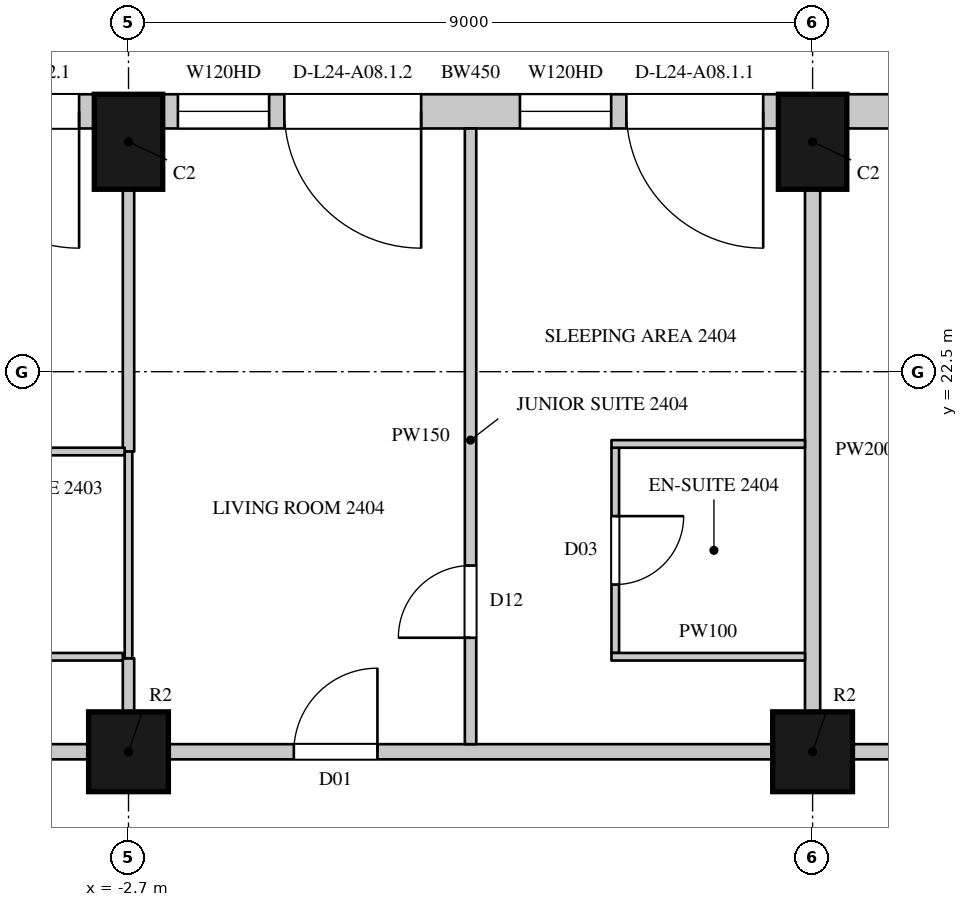
"""IFC4 building model, lengths in metres.
Left out: names, types, materials, properties, quantities, classifications, styles, units other than length and angle.
Written with IfcOpenShell. Run it as: python <this file> out.ifc"""

import sys

from ifc_helpers import new_model, si_unit, direction, frame, frame_2d, origin, origin_2d, place, context, subcontext, project, spatial, rectangle, circle, extrude, element, fill, save


model = new_model("IFC4")
c1 = context("Model", 3, precision=1e-05, world=origin(), true_north=direction((0.0, 1.0)))
c2 = subcontext(c1, "Body", "Model", "MODEL_VIEW")
j1 = project(units=[si_unit("LENGTHUNIT", "METRE"), si_unit("PLANEANGLEUNIT", "RADIAN")], contexts=[c1])
p1 = place(None, origin())
s1 = spatial("IfcSite", under=j1, at=p1, CompositionType="ELEMENT")
p2 = place(p1, origin())
s2 = spatial("IfcBuilding", under=s1, at=p2, CompositionType="ELEMENT")
p3 = place(p2, frame((0.0, 0.0, 116.7)))
s3 = spatial("IfcBuildingStorey", under=s2, at=p3, CompositionType="ELEMENT", Elevation=116.7)
for number, where, z_axis, x_axis in (
    (1, (6.3, 25.525, 0.0), (0.0, 0.0, 1.0), (-1.0, 0.0, 0.0)),
    (2, (-2.7, 25.525, 0.0), (0.0, 0.0, 1.0), (-1.0, 0.0, 0.0)),
):
    element("IfcColumn", number, at=place(p3, frame(where, z_axis=z_axis, x_axis=x_axis)), inside=s3, PredefinedType="COLUMN", context=c2, shape_type="SweptSolid", body=[
        extrude(rectangle(XDim=0.9, YDim=1.25, at=origin_2d()), origin(), (0.0, 0.0, 1.0), 3.6),
    ])
for number, where, z_axis, x_axis in (
    (3, (-2.7, 17.5, 0.0), (0.0, 0.0, 1.0), (1.0, 0.0, 0.0)),
    (4, (6.3, 17.5, 0.0), (0.0, 0.0, 1.0), (1.0, 0.0, 0.0)),
):
    element("IfcColumn", number, at=place(p3, frame(where, z_axis=z_axis, x_axis=x_axis)), inside=s3, PredefinedType="COLUMN", context=c2, shape_type="SweptSolid", body=[
        extrude(circle(Radius=0.525, at=origin_2d()), origin(), (0.0, 0.0, 1.0), 3.6),
    ])
p4 = place(p3, frame((11.989, 25.925, 0.0), z_axis=(0.0, 0.0, 1.0), x_axis=(-1.0, 0.0, 0.0)))
e5 = element("IfcWall", 5, at=p4, inside=s3, PredefinedType="SOLIDWALL", context=c2, shape_type="SweptSolid", body=[
    extrude(rectangle(XDim=5.239, YDim=0.45, at=frame_2d((2.619, 0.0))), origin(), (0.0, 0.0, 1.0), 3.3),
])
p5 = place(p4, frame((1.77, 0.0, 1.05)))
e6 = element("IfcOpeningElement", 6, at=p5, cuts=e5, PredefinedType="OPENING", context=c2, shape_type="SweptSolid", body=[
    extrude(rectangle(XDim=2.1, YDim=2.0, at=frame_2d((1.05, 1.0))), frame((0.0, 0.235, 0.0), z_axis=(0.0, -1.0, 0.0), x_axis=(1.0, 0.0, 0.0)), (0.0, 0.0, 1.0), 0.47),
])
p6 = place(p3, frame((5.85, 25.925, 0.0), z_axis=(0.0, 0.0, 1.0), x_axis=(-1.0, 0.0, 0.0)))
e7 = element("IfcWall", 7, at=p6, inside=s3, PredefinedType="SOLIDWALL", context=c2, shape_type="SweptSolid", body=[
    extrude(rectangle(XDim=8.1, YDim=0.45, at=frame_2d((4.05, 0.0))), origin(), (0.0, 0.0, 1.0), 3.3),
])
p7 = place(p6, frame((0.2, 0.0, 0.0)))
e8 = element("IfcOpeningElement", 8, at=p7, cuts=e7, PredefinedType="OPENING", context=c2, shape_type="SweptSolid", body=[
    extrude(rectangle(XDim=1.8, YDim=2.4, at=frame_2d((0.9, 1.2))), frame((0.0, 0.235, 0.0), z_axis=(0.0, -1.0, 0.0), x_axis=(1.0, 0.0, 0.0)), (0.0, 0.0, 1.0), 0.47),
])
p8 = place(p6, frame((2.2, 0.0, 1.05)))
e9 = element("IfcOpeningElement", 9, at=p8, cuts=e7, PredefinedType="OPENING", context=c2, shape_type="SweptSolid", body=[
    extrude(rectangle(XDim=1.2, YDim=2.0, at=frame_2d((0.6, 1.0))), frame((0.0, 0.235, 0.0), z_axis=(0.0, -1.0, 0.0), x_axis=(1.0, 0.0, 0.0)), (0.0, 0.0, 1.0), 0.47),
])
p9 = place(p6, frame((4.7, 0.0, 0.0)))
e10 = element("IfcOpeningElement", 10, at=p9, cuts=e7, PredefinedType="OPENING", context=c2, shape_type="SweptSolid", body=[
    extrude(rectangle(XDim=1.8, YDim=2.4, at=frame_2d((0.9, 1.2))), frame((0.0, 0.235, 0.0), z_axis=(0.0, -1.0, 0.0), x_axis=(1.0, 0.0, 0.0)), (0.0, 0.0, 1.0), 0.47),
])
p10 = place(p6, frame((6.7, 0.0, 1.05)))
e11 = element("IfcOpeningElement", 11, at=p10, cuts=e7, PredefinedType="OPENING", context=c2, shape_type="SweptSolid", body=[
    extrude(rectangle(XDim=1.2, YDim=2.0, at=frame_2d((0.6, 1.0))), frame((0.0, 0.235, 0.0), z_axis=(0.0, -1.0, 0.0), x_axis=(1.0, 0.0, 0.0)), (0.0, 0.0, 1.0), 0.47),
])
p11 = place(p3, frame((-3.15, 25.925, 0.0), z_axis=(0.0, 0.0, 1.0), x_axis=(-1.0, 0.0, 0.0)))
e12 = element("IfcWall", 12, at=p11, inside=s3, PredefinedType="SOLIDWALL", context=c2, shape_type="SweptSolid", body=[
    extrude(rectangle(XDim=8.1, YDim=0.45, at=frame_2d((4.05, 0.0))), origin(), (0.0, 0.0, 1.0), 3.3),
])
p12 = place(p11, frame((0.2, 0.0, 0.0)))
e13 = element("IfcOpeningElement", 13, at=p12, cuts=e12, PredefinedType="OPENING", context=c2, shape_type="SweptSolid", body=[
    extrude(rectangle(XDim=1.8, YDim=2.4, at=frame_2d((0.9, 1.2))), frame((0.0, 0.235, 0.0), z_axis=(0.0, -1.0, 0.0), x_axis=(1.0, 0.0, 0.0)), (0.0, 0.0, 1.0), 0.47),
])
p13 = place(p11, frame((2.2, 0.0, 1.05)))
e14 = element("IfcOpeningElement", 14, at=p13, cuts=e12, PredefinedType="OPENING", context=c2, shape_type="SweptSolid", body=[
    extrude(rectangle(XDim=1.2, YDim=2.0, at=frame_2d((0.6, 1.0))), frame((0.0, 0.235, 0.0), z_axis=(0.0, -1.0, 0.0), x_axis=(1.0, 0.0, 0.0)), (0.0, 0.0, 1.0), 0.47),
])
p14 = place(p11, frame((4.7, 0.0, 0.0)))
e15 = element("IfcOpeningElement", 15, at=p14, cuts=e12, PredefinedType="OPENING", context=c2, shape_type="SweptSolid", body=[
    extrude(rectangle(XDim=1.8, YDim=2.4, at=frame_2d((0.9, 1.2))), frame((0.0, 0.235, 0.0), z_axis=(0.0, -1.0, 0.0), x_axis=(1.0, 0.0, 0.0)), (0.0, 0.0, 1.0), 0.47),
])
p15 = place(p11, frame((6.7, 0.0, 1.05)))
e16 = element("IfcOpeningElement", 16, at=p15, cuts=e12, PredefinedType="OPENING", context=c2, shape_type="SweptSolid", body=[
    extrude(rectangle(XDim=1.2, YDim=2.0, at=frame_2d((0.6, 1.0))), frame((0.0, 0.235, 0.0), z_axis=(0.0, -1.0, 0.0), x_axis=(1.0, 0.0, 0.0)), (0.0, 0.0, 1.0), 0.47),
])
p16 = place(p3, frame((-11.175, 17.5, 0.0), z_axis=(0.0, 0.0, 1.0), x_axis=(1.0, 0.0, 0.0)))
e17 = element("IfcWall", 17, at=p16, inside=s3, PredefinedType="PARTITIONING", context=c2, shape_type="SweptSolid", body=[
    extrude(rectangle(XDim=7.95, YDim=0.2, at=frame_2d((3.975, 0.0))), origin(), (0.0, 0.0, 1.0), 2.75),
])
p17 = place(p16, frame((4.55, 0.0, 0.0)))
e18 = element("IfcOpeningElement", 18, at=p17, cuts=e17, PredefinedType="OPENING", context=c2, shape_type="SweptSolid", body=[
    extrude(rectangle(XDim=0.95, YDim=2.2, at=frame_2d((0.475, 1.1))), frame((0.0, 0.11, 0.0), z_axis=(0.0, -1.0, 0.0), x_axis=(1.0, 0.0, 0.0)), (0.0, 0.0, 1.0), 0.22),
])
p18 = place(p3, frame((-2.175, 17.5, 0.0), z_axis=(0.0, 0.0, 1.0), x_axis=(1.0, 0.0, 0.0)))
e19 = element("IfcWall", 19, at=p18, inside=s3, PredefinedType="PARTITIONING", context=c2, shape_type="SweptSolid", body=[
    extrude(rectangle(XDim=7.95, YDim=0.2, at=frame_2d((3.975, 0.0))), origin(), (0.0, 0.0, 1.0), 2.75),
])
p19 = place(p18, frame((1.65, 0.0, 0.0)))
e20 = element("IfcOpeningElement", 20, at=p19, cuts=e19, PredefinedType="OPENING", context=c2, shape_type="SweptSolid", body=[
    extrude(rectangle(XDim=1.1, YDim=2.4, at=frame_2d((0.55, 1.2))), frame((0.0, 0.11, 0.0), z_axis=(0.0, -1.0, 0.0), x_axis=(1.0, 0.0, 0.0)), (0.0, 0.0, 1.0), 0.22),
])
p20 = place(p3, frame((6.825, 17.5, 0.0), z_axis=(0.0, 0.0, 1.0), x_axis=(1.0, 0.0, 0.0)))
e21 = element("IfcWall", 21, at=p20, inside=s3, PredefinedType="PARTITIONING", context=c2, shape_type="SweptSolid", body=[
    extrude(rectangle(XDim=7.95, YDim=0.2, at=frame_2d((3.975, 0.0))), origin(), (0.0, 0.0, 1.0), 2.75),
])
p21 = place(p20, frame((1.55, 0.0, 0.0)))
e22 = element("IfcOpeningElement", 22, at=p21, cuts=e21, PredefinedType="OPENING", context=c2, shape_type="SweptSolid", body=[
    extrude(rectangle(XDim=1.1, YDim=2.4, at=frame_2d((0.55, 1.2))), frame((0.0, 0.11, 0.0), z_axis=(0.0, -1.0, 0.0), x_axis=(1.0, 0.0, 0.0)), (0.0, 0.0, 1.0), 0.22),
])
p22 = place(p3, frame((-2.7, 18.025, 0.0), z_axis=(0.0, 0.0, 1.0), x_axis=(0.0, 1.0, 0.0)))
e23 = element("IfcWall", 23, at=p22, inside=s3, PredefinedType="PARTITIONING", context=c2, shape_type="SweptSolid", body=[
    extrude(rectangle(XDim=0.705, YDim=0.15, at=frame_2d((0.353, 0.0))), origin(), (0.0, 0.0, 1.0), 2.75),
])
p23 = place(p3, frame((-2.7, 21.45, 0.0), z_axis=(0.0, 0.0, 1.0), x_axis=(0.0, 1.0, 0.0)))
e24 = element("IfcWall", 24, at=p23, inside=s3, PredefinedType="PARTITIONING", context=c2, shape_type="SweptSolid", body=[
    extrude(rectangle(XDim=3.45, YDim=0.15, at=frame_2d((1.725, 0.0))), origin(), (0.0, 0.0, 1.0), 2.75),
])
p24 = place(p3, frame((1.8, 17.6, 0.0), z_axis=(0.0, 0.0, 1.0), x_axis=(0.0, 1.0, 0.0)))
e25 = element("IfcWall", 25, at=p24, inside=s3, PredefinedType="PARTITIONING", context=c2, shape_type="SweptSolid", body=[
    extrude(rectangle(XDim=8.1, YDim=0.15, at=frame_2d((4.05, 0.0))), origin(), (0.0, 0.0, 1.0), 2.65),
])
p25 = place(p24, frame((1.4, 0.0, 0.0)))
e26 = element("IfcOpeningElement", 26, at=p25, cuts=e25, PredefinedType="OPENING", context=c2, shape_type="SweptSolid", body=[
    extrude(rectangle(XDim=0.95, YDim=2.2, at=frame_2d((0.475, 1.1))), frame((0.0, 0.085, 0.0), z_axis=(0.0, -1.0, 0.0), x_axis=(1.0, 0.0, 0.0)), (0.0, 0.0, 1.0), 0.17),
])
p26 = place(p3, frame((6.3, 18.025, 0.0), z_axis=(0.0, 0.0, 1.0), x_axis=(0.0, 1.0, 0.0)))
e27 = element("IfcWall", 27, at=p26, inside=s3, PredefinedType="PARTITIONING", context=c2, shape_type="SweptSolid", body=[
    extrude(rectangle(XDim=6.875, YDim=0.2, at=frame_2d((3.438, 0.0))), origin(), (0.0, 0.0, 1.0), 2.75),
])
p27 = place(p3, frame((-5.146, 18.75, 0.0), z_axis=(0.0, 0.0, 1.0), x_axis=(1.0, 0.0, 0.0)))
e28 = element("IfcWall", 28, at=p27, inside=s3, PredefinedType="PARTITIONING", context=c2, shape_type="SweptSolid", body=[
    extrude(rectangle(XDim=2.371, YDim=0.1, at=frame_2d((1.186, 0.0))), origin(), (0.0, 0.0, 1.0), 3.3),
])
p28 = place(p3, frame((-5.146, 21.45, 0.0), z_axis=(0.0, 0.0, 1.0), x_axis=(1.0, 0.0, 0.0)))
e29 = element("IfcWall", 29, at=p28, inside=s3, PredefinedType="PARTITIONING", context=c2, shape_type="SweptSolid", body=[
    extrude(rectangle(XDim=2.396, YDim=0.1, at=frame_2d((1.198, 0.0))), origin(), (0.0, 0.0, 1.0), 3.3),
])
p29 = place(p3, frame((-2.7, 18.73, 0.0), z_axis=(0.0, 0.0, 1.0), x_axis=(0.0, 1.0, 0.0)))
e30 = element("IfcWall", 30, at=p29, inside=s3, PredefinedType="PARTITIONING", context=c2, shape_type="SweptSolid", body=[
    extrude(rectangle(XDim=2.72, YDim=0.1, at=frame_2d((1.36, 0.0))), origin(), (0.0, 0.0, 1.0), 2.75),
])
p30 = place(p3, frame((3.704, 18.8, 0.0), z_axis=(0.0, 0.0, 1.0), x_axis=(0.0, 1.0, 0.0)))
e31 = element("IfcWall", 31, at=p30, inside=s3, PredefinedType="PARTITIONING", context=c2, shape_type="SweptSolid", body=[
    extrude(rectangle(XDim=2.7, YDim=0.1, at=frame_2d((1.35, 0.0))), origin(), (0.0, 0.0, 1.0), 3.3),
])
p31 = place(p30, frame((0.9, 0.0, 0.0)))
e32 = element("IfcOpeningElement", 32, at=p31, cuts=e31, PredefinedType="OPENING", context=c2, shape_type="SweptSolid", body=[
    extrude(rectangle(XDim=0.9, YDim=2.2, at=frame_2d((0.45, 1.1))), frame((0.0, 0.06, 0.0), z_axis=(0.0, -1.0, 0.0), x_axis=(1.0, 0.0, 0.0)), (0.0, 0.0, 1.0), 0.12),
])
for number, where, z_axis, x_axis in (
    (33, (3.654, 18.75, 0.0), (0.0, 0.0, 1.0), (1.0, 0.0, 0.0)),
    (34, (3.654, 21.55, 0.0), (0.0, 0.0, 1.0), (1.0, 0.0, 0.0)),
):
    element("IfcWall", number, at=place(p3, frame(where, z_axis=z_axis, x_axis=x_axis)), inside=s3, PredefinedType="PARTITIONING", context=c2, shape_type="SweptSolid", body=[
        extrude(rectangle(XDim=2.546, YDim=0.1, at=frame_2d((1.273, 0.0))), origin(), (0.0, 0.0, 1.0), 3.3),
    ])
p32 = place(p7, origin())
e35 = element("IfcDoor", 35, at=p32, inside=s3, OperationType="SLIDING_TO_LEFT", PredefinedType="DOOR", context=c2, shape_type="SweptSolid", body=[
    extrude(rectangle(XDim=1.8, YDim=2.4, at=frame_2d((0.9, 1.2))), frame((0.0, 0.13, 0.0), z_axis=(0.0, -1.0, 0.0), x_axis=(1.0, 0.0, 0.0)), (0.0, 0.0, 1.0), 0.05),
])
fill(e8, e35)
p33 = place(p8, origin())
e36 = element("IfcWindow", 36, at=p33, inside=s3, PartitioningType="SINGLE_PANEL", PredefinedType="WINDOW", context=c2, shape_type="SweptSolid", body=[
    extrude(rectangle(XDim=1.2, YDim=2.0, at=frame_2d((0.6, 1.0))), frame((0.0, 0.135, 0.0), z_axis=(0.0, -1.0, 0.0), x_axis=(1.0, 0.0, 0.0)), (0.0, 0.0, 1.0), 0.06),
])
fill(e9, e36)
p34 = place(p9, origin())
e37 = element("IfcDoor", 37, at=p34, inside=s3, OperationType="SLIDING_TO_LEFT", PredefinedType="DOOR", context=c2, shape_type="SweptSolid", body=[
    extrude(rectangle(XDim=1.8, YDim=2.4, at=frame_2d((0.9, 1.2))), frame((0.0, 0.13, 0.0), z_axis=(0.0, -1.0, 0.0), x_axis=(1.0, 0.0, 0.0)), (0.0, 0.0, 1.0), 0.05),
])
fill(e10, e37)
p35 = place(p10, origin())
e38 = element("IfcWindow", 38, at=p35, inside=s3, PartitioningType="SINGLE_PANEL", PredefinedType="WINDOW", context=c2, shape_type="SweptSolid", body=[
    extrude(rectangle(XDim=1.2, YDim=2.0, at=frame_2d((0.6, 1.0))), frame((0.0, 0.135, 0.0), z_axis=(0.0, -1.0, 0.0), x_axis=(1.0, 0.0, 0.0)), (0.0, 0.0, 1.0), 0.06),
])
fill(e11, e38)
p36 = place(p12, origin())
e39 = element("IfcDoor", 39, at=p36, inside=s3, OperationType="SLIDING_TO_LEFT", PredefinedType="DOOR", context=c2, shape_type="SweptSolid", body=[
    extrude(rectangle(XDim=1.8, YDim=2.4, at=frame_2d((0.9, 1.2))), frame((0.0, 0.13, 0.0), z_axis=(0.0, -1.0, 0.0), x_axis=(1.0, 0.0, 0.0)), (0.0, 0.0, 1.0), 0.05),
])
fill(e13, e39)
p37 = place(p19, origin())
e40 = element("IfcDoor", 40, at=p37, inside=s3, OperationType="SINGLE_SWING_RIGHT", PredefinedType="DOOR", context=c2, shape_type="SweptSolid", body=[
    extrude(rectangle(XDim=1.1, YDim=2.4, at=frame_2d((0.55, 1.2))), frame((0.0, 0.025, 0.0), z_axis=(0.0, -1.0, 0.0), x_axis=(1.0, 0.0, 0.0)), (0.0, 0.0, 1.0), 0.05),
])
fill(e20, e40)
p38 = place(p25, origin())
e41 = element("IfcDoor", 41, at=p38, inside=s3, OperationType="SINGLE_SWING_LEFT", PredefinedType="DOOR", context=c2, shape_type="SweptSolid", body=[
    extrude(rectangle(XDim=0.95, YDim=2.2, at=frame_2d((0.475, 1.1))), frame((0.0, 0.025, 0.0), z_axis=(0.0, -1.0, 0.0), x_axis=(1.0, 0.0, 0.0)), (0.0, 0.0, 1.0), 0.05),
])
fill(e26, e41)
p39 = place(p31, origin())
e42 = element("IfcDoor", 42, at=p39, inside=s3, OperationType="SINGLE_SWING_LEFT", PredefinedType="DOOR", context=c2, shape_type="SweptSolid", body=[
    extrude(rectangle(XDim=0.9, YDim=2.2, at=frame_2d((0.45, 1.1))), frame((0.0, 0.025, 0.0), z_axis=(0.0, -1.0, 0.0), x_axis=(1.0, 0.0, 0.0)), (0.0, 0.0, 1.0), 0.05),
])
fill(e32, e42)
save(model, sys.argv[1])
